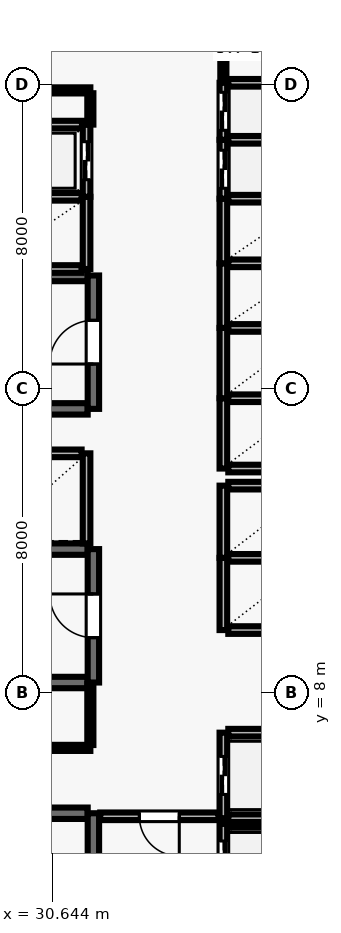
"""IFC4 building model, lengths in metres.
Left out: names, types, materials, properties, quantities, classifications, styles, units other than length and angle.
Written with IfcOpenShell. Run it as: python <this file> out.ifc"""

import sys

from ifc_helpers import new_model, si_unit, direction, frame, frame_2d, origin, place, context, subcontext, project, spatial, rectangle, extrude, element, fill, save


model = new_model("IFC4")
c1 = context("Model", 3, precision=1e-05, world=origin(), true_north=direction((0.0, 1.0)))
c2 = subcontext(c1, "Body", "Model", "MODEL_VIEW")
j1 = project(units=[si_unit("LENGTHUNIT", "METRE"), si_unit("PLANEANGLEUNIT", "RADIAN")], contexts=[c1])
p1 = place(None, origin())
s1 = spatial("IfcSite", under=j1, at=p1, CompositionType="ELEMENT")
p2 = place(p1, origin())
s2 = spatial("IfcBuilding", under=s1, at=p2, CompositionType="ELEMENT")
p3 = place(p2, frame((0.0, 0.0, 73.9)))
s3 = spatial("IfcBuildingStorey", under=s2, at=p3, CompositionType="ELEMENT", Elevation=73.9)
p4 = place(p3, frame((31.58, 4.83, 0.0), z_axis=(0.0, 0.0, 1.0), x_axis=(-1.0, 0.0, 0.0)))
e1 = element("IfcWall", 1, at=p4, inside=s3, PredefinedType="SHEAR", context=c2, shape_type="SweptSolid", body=[
    extrude(rectangle(XDim=8.36, YDim=0.3, at=frame_2d((4.18, 0.0))), origin(), (0.0, 0.0, 1.0), 3.69),
])
p5 = place(p3, frame((31.73, 0.96, 0.0), z_axis=(0.0, 0.0, 1.0), x_axis=(0.0, 1.0, 0.0)))
e2 = element("IfcWall", 2, at=p5, inside=s3, PredefinedType="SHEAR", context=c2, shape_type="SweptSolid", body=[
    extrude(rectangle(XDim=3.87, YDim=0.3, at=frame_2d((1.935, 0.0))), origin(), (0.0, 0.0, 1.0), 3.69),
])
p6 = place(p5, frame((1.54, 0.0, 0.0)))
e3 = element("IfcOpeningElement", 3, at=p6, cuts=e2, PredefinedType="OPENING", context=c2, shape_type="SweptSolid", body=[
    extrude(rectangle(XDim=1.15, YDim=2.15, at=frame_2d((0.575, 1.075))), frame((0.0, 0.16, 0.0), z_axis=(0.0, -1.0, 0.0), x_axis=(1.0, 0.0, 0.0)), (0.0, 0.0, 1.0), 0.32),
])
for number, where, z_axis, x_axis in (
    (4, (31.58, 18.98, 0.0), (0.0, 0.0, 1.0), (-1.0, 0.0, 0.0)),
    (5, (23.22, 15.47, 0.0), (0.0, 0.0, 1.0), (1.0, 0.0, 0.0)),
):
    element("IfcWall", number, at=place(p3, frame(where, z_axis=z_axis, x_axis=x_axis)), inside=s3, PredefinedType="SHEAR", context=c2, shape_type="SweptSolid", body=[
        extrude(rectangle(XDim=8.36, YDim=0.3, at=frame_2d((4.18, 0.0))), origin(), (0.0, 0.0, 1.0), 3.69),
    ])
p7 = place(p3, frame((31.73, 15.47, 0.0), z_axis=(0.0, 0.0, 1.0), x_axis=(0.0, 1.0, 0.0)))
e6 = element("IfcWall", 6, at=p7, inside=s3, PredefinedType="SHEAR", context=c2, shape_type="SweptSolid", body=[
    extrude(rectangle(XDim=3.51, YDim=0.3, at=frame_2d((1.755, 0.0))), origin(), (0.0, 0.0, 1.0), 3.69),
])
p8 = place(p7, frame((1.18, 0.0, 0.0)))
e7 = element("IfcOpeningElement", 7, at=p8, cuts=e6, PredefinedType="OPENING", context=c2, shape_type="SweptSolid", body=[
    extrude(rectangle(XDim=1.15, YDim=2.15, at=frame_2d((0.575, 1.075))), frame((0.0, 0.16, 0.0), z_axis=(0.0, -1.0, 0.0), x_axis=(1.0, 0.0, 0.0)), (0.0, 0.0, 1.0), 0.32),
])
for number, where, z_axis, x_axis in (
    (8, (31.58, 11.78, 0.0), (0.0, 0.0, 1.0), (-1.0, 0.0, 0.0)),
    (9, (23.22, 8.27, 0.0), (0.0, 0.0, 1.0), (1.0, 0.0, 0.0)),
):
    element("IfcWall", number, at=place(p3, frame(where, z_axis=z_axis, x_axis=x_axis)), inside=s3, PredefinedType="SHEAR", context=c2, shape_type="SweptSolid", body=[
        extrude(rectangle(XDim=8.36, YDim=0.3, at=frame_2d((4.18, 0.0))), origin(), (0.0, 0.0, 1.0), 3.69),
    ])
p9 = place(p3, frame((31.73, 8.27, 0.0), z_axis=(0.0, 0.0, 1.0), x_axis=(0.0, 1.0, 0.0)))
e10 = element("IfcWall", 10, at=p9, inside=s3, PredefinedType="SHEAR", context=c2, shape_type="SweptSolid", body=[
    extrude(rectangle(XDim=3.51, YDim=0.3, at=frame_2d((1.755, 0.0))), origin(), (0.0, 0.0, 1.0), 3.69),
])
p10 = place(p9, frame((1.18, 0.0, 0.0)))
e11 = element("IfcOpeningElement", 11, at=p10, cuts=e10, PredefinedType="OPENING", context=c2, shape_type="SweptSolid", body=[
    extrude(rectangle(XDim=1.15, YDim=2.15, at=frame_2d((0.575, 1.075))), frame((0.0, 0.16, 0.0), z_axis=(0.0, -1.0, 0.0), x_axis=(1.0, 0.0, 0.0)), (0.0, 0.0, 1.0), 0.32),
])
p11 = place(p3, frame((35.15, 4.55, 0.0), z_axis=(0.0, 0.0, 1.0), x_axis=(0.0, -1.0, 0.0)))
e12 = element("IfcWall", 12, at=p11, inside=s3, PredefinedType="SOLIDWALL", context=c2, shape_type="SweptSolid", body=[
    extrude(rectangle(XDim=2.1, YDim=0.2, at=frame_2d((1.05, 0.0))), origin(), (0.0, 0.0, 1.0), 3.69),
])
p12 = place(p11, frame((0.45, 0.0, 0.0)))
e13 = element("IfcOpeningElement", 13, at=p12, cuts=e12, PredefinedType="OPENING", context=c2, shape_type="SweptSolid", body=[
    extrude(rectangle(XDim=1.2, YDim=2.15, at=frame_2d((0.6, 1.075))), frame((0.0, 0.11, 0.0), z_axis=(0.0, -1.0, 0.0), x_axis=(1.0, 0.0, 0.0)), (0.0, 0.0, 1.0), 0.22),
])
p13 = place(p3, frame((37.42, 4.55, 0.0), z_axis=(0.0, 0.0, 1.0), x_axis=(-1.0, 0.0, 0.0)))
e14 = element("IfcWall", 14, at=p13, inside=s3, PredefinedType="SOLIDWALL", context=c2, shape_type="SweptSolid", body=[
    extrude(rectangle(XDim=2.14, YDim=0.2, at=frame_2d((1.07, 0.0))), origin(), (0.0, 0.0, 1.0), 3.69),
])
p14 = place(p3, frame((35.15, 6.95, 0.0), z_axis=(0.0, 0.0, 1.0), x_axis=(0.0, -1.0, 0.0)))
e15 = element("IfcWall", 15, at=p14, inside=s3, PredefinedType="SOLIDWALL", context=c2, shape_type="SweptSolid", body=[
    extrude(rectangle(XDim=2.25, YDim=0.2, at=frame_2d((1.125, 0.0))), origin(), (0.0, 0.0, 1.0), 3.69),
])
p15 = place(p14, frame((0.625, 0.0, 0.0)))
e16 = element("IfcOpeningElement", 16, at=p15, cuts=e15, PredefinedType="OPENING", context=c2, shape_type="SweptSolid", body=[
    extrude(rectangle(XDim=1.0, YDim=2.1, at=frame_2d((0.5, 1.05))), frame((0.0, 0.11, 0.0), z_axis=(0.0, -1.0, 0.0), x_axis=(1.0, 0.0, 0.0)), (0.0, 0.0, 1.0), 0.22),
])
for number, where, z_axis, x_axis in (
    (17, (35.28, 4.7, 0.0), (0.0, 0.0, 1.0), (1.0, 0.0, 0.0)),
    (18, (37.42, 6.95, 0.0), (0.0, 0.0, 1.0), (-1.0, 0.0, 0.0)),
):
    element("IfcWall", number, at=place(p3, frame(where, z_axis=z_axis, x_axis=x_axis)), inside=s3, PredefinedType="SOLIDWALL", context=c2, shape_type="SweptSolid", body=[
        extrude(rectangle(XDim=2.14, YDim=0.2, at=frame_2d((1.07, 0.0))), origin(), (0.0, 0.0, 1.0), 3.69),
    ])
p16 = place(p3, frame((35.15, 11.55, 0.0), z_axis=(0.0, 0.0, 1.0), x_axis=(0.0, -1.0, 0.0)))
e19 = element("IfcWall", 19, at=p16, inside=s3, PredefinedType="SOLIDWALL", context=c2, shape_type="SweptSolid", body=[
    extrude(rectangle(XDim=1.9, YDim=0.2, at=frame_2d((0.95, 0.0))), origin(), (0.0, 0.0, 1.0), 3.69),
])
for number, where, z_axis, x_axis in (
    (20, (35.28, 9.65, 0.0), (0.0, 0.0, 1.0), (1.0, 0.0, 0.0)),
    (21, (37.42, 11.55, 0.0), (0.0, 0.0, 1.0), (-1.0, 0.0, 0.0)),
):
    element("IfcWall", number, at=place(p3, frame(where, z_axis=z_axis, x_axis=x_axis)), inside=s3, PredefinedType="SOLIDWALL", context=c2, shape_type="SweptSolid", body=[
        extrude(rectangle(XDim=2.14, YDim=0.2, at=frame_2d((1.07, 0.0))), origin(), (0.0, 0.0, 1.0), 3.69),
    ])
p17 = place(p3, frame((35.15, 13.45, 0.0), z_axis=(0.0, 0.0, 1.0), x_axis=(0.0, -1.0, 0.0)))
e22 = element("IfcWall", 22, at=p17, inside=s3, PredefinedType="SOLIDWALL", context=c2, shape_type="SweptSolid", body=[
    extrude(rectangle(XDim=1.9, YDim=0.2, at=frame_2d((0.95, 0.0))), origin(), (0.0, 0.0, 1.0), 3.69),
])
p18 = place(p3, frame((37.42, 13.45, 0.0), z_axis=(0.0, 0.0, 1.0), x_axis=(-1.0, 0.0, 0.0)))
e23 = element("IfcWall", 23, at=p18, inside=s3, PredefinedType="SOLIDWALL", context=c2, shape_type="SweptSolid", body=[
    extrude(rectangle(XDim=2.14, YDim=0.2, at=frame_2d((1.07, 0.0))), origin(), (0.0, 0.0, 1.0), 3.69),
])
p19 = place(p3, frame((31.55, 11.93, 0.0), z_axis=(0.0, 0.0, 1.0), x_axis=(0.0, 1.0, 0.0)))
e24 = element("IfcWall", 24, at=p19, inside=s3, PredefinedType="SOLIDWALL", context=c2, shape_type="SweptSolid", body=[
    extrude(rectangle(XDim=2.37, YDim=0.2, at=frame_2d((1.185, 0.0))), origin(), (0.0, 0.0, 1.0), 3.69),
])
p20 = place(p3, frame((31.42, 14.3, 0.0), z_axis=(0.0, 0.0, 1.0), x_axis=(-1.0, 0.0, 0.0)))
e25 = element("IfcWall", 25, at=p20, inside=s3, PredefinedType="SOLIDWALL", context=c2, shape_type="SweptSolid", body=[
    extrude(rectangle(XDim=2.44, YDim=0.2, at=frame_2d((1.22, 0.0))), origin(), (0.0, 0.0, 1.0), 3.69),
])
p21 = place(p3, frame((35.15, 15.75, 0.0), z_axis=(0.0, 0.0, 1.0), x_axis=(0.0, -1.0, 0.0)))
e26 = element("IfcWall", 26, at=p21, inside=s3, PredefinedType="SOLIDWALL", context=c2, shape_type="SweptSolid", body=[
    extrude(rectangle(XDim=1.85, YDim=0.2, at=frame_2d((0.925, 0.0))), origin(), (0.0, 0.0, 1.0), 3.69),
])
for number, where, z_axis, x_axis in (
    (27, (35.28, 13.9, 0.0), (0.0, 0.0, 1.0), (1.0, 0.0, 0.0)),
    (28, (37.42, 15.75, 0.0), (0.0, 0.0, 1.0), (-1.0, 0.0, 0.0)),
):
    element("IfcWall", number, at=place(p3, frame(where, z_axis=z_axis, x_axis=x_axis)), inside=s3, PredefinedType="SOLIDWALL", context=c2, shape_type="SweptSolid", body=[
        extrude(rectangle(XDim=2.14, YDim=0.2, at=frame_2d((1.07, 0.0))), origin(), (0.0, 0.0, 1.0), 3.69),
    ])
p22 = place(p3, frame((35.15, 17.6, 0.0), z_axis=(0.0, 0.0, 1.0), x_axis=(0.0, -1.0, 0.0)))
e29 = element("IfcWall", 29, at=p22, inside=s3, PredefinedType="SOLIDWALL", context=c2, shape_type="SweptSolid", body=[
    extrude(rectangle(XDim=1.85, YDim=0.2, at=frame_2d((0.925, 0.0))), origin(), (0.0, 0.0, 1.0), 3.69),
])
p23 = place(p3, frame((37.42, 17.6, 0.0), z_axis=(0.0, 0.0, 1.0), x_axis=(-1.0, 0.0, 0.0)))
e30 = element("IfcWall", 30, at=p23, inside=s3, PredefinedType="SOLIDWALL", context=c2, shape_type="SweptSolid", body=[
    extrude(rectangle(XDim=2.14, YDim=0.2, at=frame_2d((1.07, 0.0))), origin(), (0.0, 0.0, 1.0), 3.69),
])
p24 = place(p3, frame((35.15, 19.3, 0.0), z_axis=(0.0, 0.0, 1.0), x_axis=(0.0, -1.0, 0.0)))
e31 = element("IfcWall", 31, at=p24, inside=s3, PredefinedType="SOLIDWALL", context=c2, shape_type="SweptSolid", body=[
    extrude(rectangle(XDim=1.7, YDim=0.2, at=frame_2d((0.85, 0.0))), origin(), (0.0, 0.0, 1.0), 3.69),
])
p25 = place(p3, frame((37.42, 19.3, 0.0), z_axis=(0.0, 0.0, 1.0), x_axis=(-1.0, 0.0, 0.0)))
e32 = element("IfcWall", 32, at=p25, inside=s3, PredefinedType="SOLIDWALL", context=c2, shape_type="SweptSolid", body=[
    extrude(rectangle(XDim=2.14, YDim=0.2, at=frame_2d((1.07, 0.0))), origin(), (0.0, 0.0, 1.0), 3.69),
])
p26 = place(p3, frame((35.15, 21.0, 0.0), z_axis=(0.0, 0.0, 1.0), x_axis=(0.0, -1.0, 0.0)))
e33 = element("IfcWall", 33, at=p26, inside=s3, PredefinedType="SOLIDWALL", context=c2, shape_type="SweptSolid", body=[
    extrude(rectangle(XDim=1.7, YDim=0.2, at=frame_2d((0.85, 0.0))), origin(), (0.0, 0.0, 1.0), 3.69),
])
p27 = place(p3, frame((37.42, 21.0, 0.0), z_axis=(0.0, 0.0, 1.0), x_axis=(-1.0, 0.0, 0.0)))
e34 = element("IfcWall", 34, at=p27, inside=s3, PredefinedType="SOLIDWALL", context=c2, shape_type="SweptSolid", body=[
    extrude(rectangle(XDim=2.14, YDim=0.2, at=frame_2d((1.07, 0.0))), origin(), (0.0, 0.0, 1.0), 3.69),
])
p28 = place(p3, frame((31.55, 19.15, 0.0), z_axis=(0.0, 0.0, 1.0), x_axis=(0.0, 1.0, 0.0)))
e35 = element("IfcWall", 35, at=p28, inside=s3, PredefinedType="SOLIDWALL", context=c2, shape_type="SweptSolid", body=[
    extrude(rectangle(XDim=1.9, YDim=0.2, at=frame_2d((0.95, 0.0))), origin(), (0.0, 0.0, 1.0), 3.69),
])
for number, where, z_axis, x_axis in (
    (36, (28.98, 19.15, 0.0), (0.0, 0.0, 1.0), (1.0, 0.0, 0.0)),
    (37, (31.42, 21.05, 0.0), (0.0, 0.0, 1.0), (-1.0, 0.0, 0.0)),
):
    element("IfcWall", number, at=place(p3, frame(where, z_axis=z_axis, x_axis=x_axis)), inside=s3, PredefinedType="SOLIDWALL", context=c2, shape_type="SweptSolid", body=[
        extrude(rectangle(XDim=2.44, YDim=0.2, at=frame_2d((1.22, 0.0))), origin(), (0.0, 0.0, 1.0), 3.69),
    ])
p29 = place(p3, frame((35.15, 22.55, 0.0), z_axis=(0.0, 0.0, 1.0), x_axis=(0.0, -1.0, 0.0)))
e38 = element("IfcWall", 38, at=p29, inside=s3, PredefinedType="SOLIDWALL", context=c2, shape_type="SweptSolid", body=[
    extrude(rectangle(XDim=1.55, YDim=0.2, at=frame_2d((0.775, 0.0))), origin(), (0.0, 0.0, 1.0), 3.69),
])
p30 = place(p29, frame((0.275, 0.0, 0.0)))
e39 = element("IfcOpeningElement", 39, at=p30, cuts=e38, PredefinedType="OPENING", context=c2, shape_type="SweptSolid", body=[
    extrude(rectangle(XDim=1.0, YDim=2.1, at=frame_2d((0.5, 1.05))), frame((0.0, 0.11, 0.0), z_axis=(0.0, -1.0, 0.0), x_axis=(1.0, 0.0, 0.0)), (0.0, 0.0, 1.0), 0.22),
])
p31 = place(p3, frame((37.42, 22.55, 0.0), z_axis=(0.0, 0.0, 1.0), x_axis=(-1.0, 0.0, 0.0)))
e40 = element("IfcWall", 40, at=p31, inside=s3, PredefinedType="SOLIDWALL", context=c2, shape_type="SweptSolid", body=[
    extrude(rectangle(XDim=2.14, YDim=0.2, at=frame_2d((1.07, 0.0))), origin(), (0.0, 0.0, 1.0), 3.69),
])
p32 = place(p3, frame((35.15, 24.05, 0.0), z_axis=(0.0, 0.0, 1.0), x_axis=(0.0, -1.0, 0.0)))
e41 = element("IfcWall", 41, at=p32, inside=s3, PredefinedType="SOLIDWALL", context=c2, shape_type="SweptSolid", body=[
    extrude(rectangle(XDim=1.5, YDim=0.2, at=frame_2d((0.75, 0.0))), origin(), (0.0, 0.0, 1.0), 3.69),
])
p33 = place(p32, frame((0.25, 0.0, 0.0)))
e42 = element("IfcOpeningElement", 42, at=p33, cuts=e41, PredefinedType="OPENING", context=c2, shape_type="SweptSolid", body=[
    extrude(rectangle(XDim=1.0, YDim=2.1, at=frame_2d((0.5, 1.05))), frame((0.0, 0.11, 0.0), z_axis=(0.0, -1.0, 0.0), x_axis=(1.0, 0.0, 0.0)), (0.0, 0.0, 1.0), 0.22),
])
p34 = place(p3, frame((37.42, 24.05, 0.0), z_axis=(0.0, 0.0, 1.0), x_axis=(-1.0, 0.0, 0.0)))
e43 = element("IfcWall", 43, at=p34, inside=s3, PredefinedType="SOLIDWALL", context=c2, shape_type="SweptSolid", body=[
    extrude(rectangle(XDim=2.14, YDim=0.2, at=frame_2d((1.07, 0.0))), origin(), (0.0, 0.0, 1.0), 3.69),
])
p35 = place(p3, frame((31.55, 21.05, 0.0), z_axis=(0.0, 0.0, 1.0), x_axis=(0.0, 1.0, 0.0)))
e44 = element("IfcWall", 44, at=p35, inside=s3, PredefinedType="SOLIDWALL", context=c2, shape_type="SweptSolid", body=[
    extrude(rectangle(XDim=1.9, YDim=0.2, at=frame_2d((0.95, 0.0))), origin(), (0.0, 0.0, 1.0), 3.69),
])
p36 = place(p35, frame((0.45, 0.0, 0.0)))
e45 = element("IfcOpeningElement", 45, at=p36, cuts=e44, PredefinedType="OPENING", context=c2, shape_type="SweptSolid", body=[
    extrude(rectangle(XDim=1.0, YDim=2.1, at=frame_2d((0.5, 1.05))), frame((0.0, 0.11, 0.0), z_axis=(0.0, -1.0, 0.0), x_axis=(1.0, 0.0, 0.0)), (0.0, 0.0, 1.0), 0.22),
])
p37 = place(p3, frame((31.43, 22.95, 0.0), z_axis=(0.0, 0.0, 1.0), x_axis=(-1.0, 0.0, 0.0)))
e46 = element("IfcWall", 46, at=p37, inside=s3, PredefinedType="SOLIDWALL", context=c2, shape_type="SweptSolid", body=[
    extrude(rectangle(XDim=2.46, YDim=0.2, at=frame_2d((1.23, 0.0))), origin(), (0.0, 0.0, 1.0), 3.69),
])
p38 = place(p3, frame((28.8, 23.85, 0.0), z_axis=(0.0, 0.0, 1.0), x_axis=(1.0, 0.0, 0.0)))
e47 = element("IfcWall", 47, at=p38, inside=s3, PredefinedType="PARTITIONING", context=c2, shape_type="SweptSolid", body=[
    extrude(rectangle(XDim=2.85, YDim=0.16, at=frame_2d((1.425, 0.0))), origin(), (0.0, 0.0, 1.0), 3.69),
])
p39 = place(p3, frame((31.65, 6.55, 0.0), z_axis=(0.0, 0.0, 1.0), x_axis=(-1.0, 0.0, 0.0)))
e48 = element("IfcWall", 48, at=p39, inside=s3, PredefinedType="PARTITIONING", context=c2, shape_type="SweptSolid", body=[
    extrude(rectangle(XDim=4.75, YDim=0.16, at=frame_2d((2.375, 0.0))), origin(), (0.0, 0.0, 1.0), 3.69),
])
p40 = place(p39, frame((1.935, 0.0, 0.0)))
e49 = element("IfcOpeningElement", 49, at=p40, cuts=e48, PredefinedType="OPENING", context=c2, shape_type="SweptSolid", body=[
    extrude(rectangle(XDim=0.88, YDim=2.1, at=frame_2d((0.44, 1.05))), frame((0.0, 0.09, 0.0), z_axis=(0.0, -1.0, 0.0), x_axis=(1.0, 0.0, 0.0)), (0.0, 0.0, 1.0), 0.18),
])
p41 = place(p3, frame((35.02, 4.75, 0.0), z_axis=(0.0, 0.0, 1.0), x_axis=(-1.0, 0.0, 0.0)))
e50 = element("IfcWall", 50, at=p41, inside=s3, PredefinedType="SOLIDWALL", context=c2, shape_type="SweptSolid", body=[
    extrude(rectangle(XDim=3.11, YDim=0.2, at=frame_2d((1.555, 0.0))), origin(), (0.0, 0.0, 1.0), 3.69),
])
p42 = place(p41, frame((1.03, 0.0, 0.0)))
e51 = element("IfcOpeningElement", 51, at=p42, cuts=e50, PredefinedType="OPENING", context=c2, shape_type="SweptSolid", body=[
    extrude(rectangle(XDim=1.05, YDim=2.15, at=frame_2d((0.525, 1.075))), frame((0.0, 0.11, 0.0), z_axis=(0.0, -1.0, 0.0), x_axis=(1.0, 0.0, 0.0)), (0.0, 0.0, 1.0), 0.22),
])
p43 = place(p3, frame((31.65, 8.24, 0.0), z_axis=(0.0, 0.0, 1.0), x_axis=(0.0, -1.0, 0.0)))
e52 = element("IfcWall", 52, at=p43, inside=s3, PredefinedType="PARTITIONING", context=c2, shape_type="SweptSolid", body=[
    extrude(rectangle(XDim=1.615, YDim=0.16, at=frame_2d((0.808, 0.0))), origin(), (0.0, 0.0, 1.0), 3.69),
])
p44 = place(p3, frame((31.65, 23.775, 0.0), z_axis=(0.0, 0.0, 1.0), x_axis=(0.0, -1.0, 0.0)))
e53 = element("IfcWall", 53, at=p44, inside=s3, PredefinedType="PARTITIONING", context=c2, shape_type="SweptSolid", body=[
    extrude(rectangle(XDim=0.825, YDim=0.16, at=frame_2d((0.413, 0.0))), origin(), (0.0, 0.0, 1.0), 3.69),
])
p45 = place(p3, frame((35.15, 24.07, 0.0), z_axis=(0.0, 0.0, 1.0), x_axis=(0.0, 1.0, 0.0)))
e54 = element("IfcWall", 54, at=p45, inside=s3, PredefinedType="PARTITIONING", context=c2, shape_type="SweptSolid", body=[
    extrude(rectangle(XDim=1.855, YDim=0.16, at=frame_2d((0.927, 0.0))), origin(), (0.0, 0.0, 1.0), 3.69),
])
p46 = place(p8, origin())
e55 = element("IfcDoor", 55, at=p46, inside=s3, OperationType="SINGLE_SWING_LEFT", PredefinedType="DOOR", context=c2, shape_type="SweptSolid", body=[
    extrude(rectangle(XDim=1.15, YDim=2.15, at=frame_2d((0.575, 1.075))), frame((0.0, 0.025, 0.0), z_axis=(0.0, -1.0, 0.0), x_axis=(1.0, 0.0, 0.0)), (0.0, 0.0, 1.0), 0.05),
])
fill(e7, e55)
p47 = place(p10, origin())
e56 = element("IfcDoor", 56, at=p47, inside=s3, OperationType="SINGLE_SWING_RIGHT", PredefinedType="DOOR", context=c2, shape_type="SweptSolid", body=[
    extrude(rectangle(XDim=1.15, YDim=2.15, at=frame_2d((0.575, 1.075))), frame((0.0, 0.025, 0.0), z_axis=(0.0, -1.0, 0.0), x_axis=(1.0, 0.0, 0.0)), (0.0, 0.0, 1.0), 0.05),
])
fill(e11, e56)
p48 = place(p12, origin())
e57 = element("IfcDoor", 57, at=p48, inside=s3, OperationType="DOUBLE_DOOR_SLIDING", PredefinedType="DOOR", context=c2, shape_type="SweptSolid", body=[
    extrude(rectangle(XDim=1.2, YDim=2.15, at=frame_2d((0.6, 1.075))), frame((0.0, 0.025, 0.0), z_axis=(0.0, -1.0, 0.0), x_axis=(1.0, 0.0, 0.0)), (0.0, 0.0, 1.0), 0.05),
])
fill(e13, e57)
p49 = place(p15, origin())
e58 = element("IfcDoor", 58, at=p49, inside=s3, OperationType="DOUBLE_DOOR_SLIDING", PredefinedType="DOOR", context=c2, shape_type="SweptSolid", body=[
    extrude(rectangle(XDim=1.0, YDim=2.1, at=frame_2d((0.5, 1.05))), frame((0.0, 0.025, 0.0), z_axis=(0.0, -1.0, 0.0), x_axis=(1.0, 0.0, 0.0)), (0.0, 0.0, 1.0), 0.05),
])
fill(e16, e58)
p50 = place(p30, origin())
e59 = element("IfcDoor", 59, at=p50, inside=s3, OperationType="DOUBLE_DOOR_SLIDING", PredefinedType="DOOR", context=c2, shape_type="SweptSolid", body=[
    extrude(rectangle(XDim=1.0, YDim=2.1, at=frame_2d((0.5, 1.05))), frame((0.0, 0.025, 0.0), z_axis=(0.0, -1.0, 0.0), x_axis=(1.0, 0.0, 0.0)), (0.0, 0.0, 1.0), 0.05),
])
fill(e39, e59)
p51 = place(p33, origin())
e60 = element("IfcDoor", 60, at=p51, inside=s3, OperationType="DOUBLE_DOOR_SLIDING", PredefinedType="DOOR", context=c2, shape_type="SweptSolid", body=[
    extrude(rectangle(XDim=1.0, YDim=2.1, at=frame_2d((0.5, 1.05))), frame((0.0, 0.025, 0.0), z_axis=(0.0, -1.0, 0.0), x_axis=(1.0, 0.0, 0.0)), (0.0, 0.0, 1.0), 0.05),
])
fill(e42, e60)
p52 = place(p36, origin())
e61 = element("IfcDoor", 61, at=p52, inside=s3, OperationType="DOUBLE_DOOR_SLIDING", PredefinedType="DOOR", context=c2, shape_type="SweptSolid", body=[
    extrude(rectangle(XDim=1.0, YDim=2.1, at=frame_2d((0.5, 1.05))), frame((0.0, 0.025, 0.0), z_axis=(0.0, -1.0, 0.0), x_axis=(1.0, 0.0, 0.0)), (0.0, 0.0, 1.0), 0.05),
])
fill(e45, e61)
p53 = place(p42, origin())
e62 = element("IfcDoor", 62, at=p53, inside=s3, OperationType="SINGLE_SWING_LEFT", PredefinedType="DOOR", context=c2, shape_type="SweptSolid", body=[
    extrude(rectangle(XDim=1.05, YDim=2.15, at=frame_2d((0.525, 1.075))), frame((0.0, 0.025, 0.0), z_axis=(0.0, -1.0, 0.0), x_axis=(1.0, 0.0, 0.0)), (0.0, 0.0, 1.0), 0.05),
])
fill(e51, e62)
save(model, sys.argv[1])
